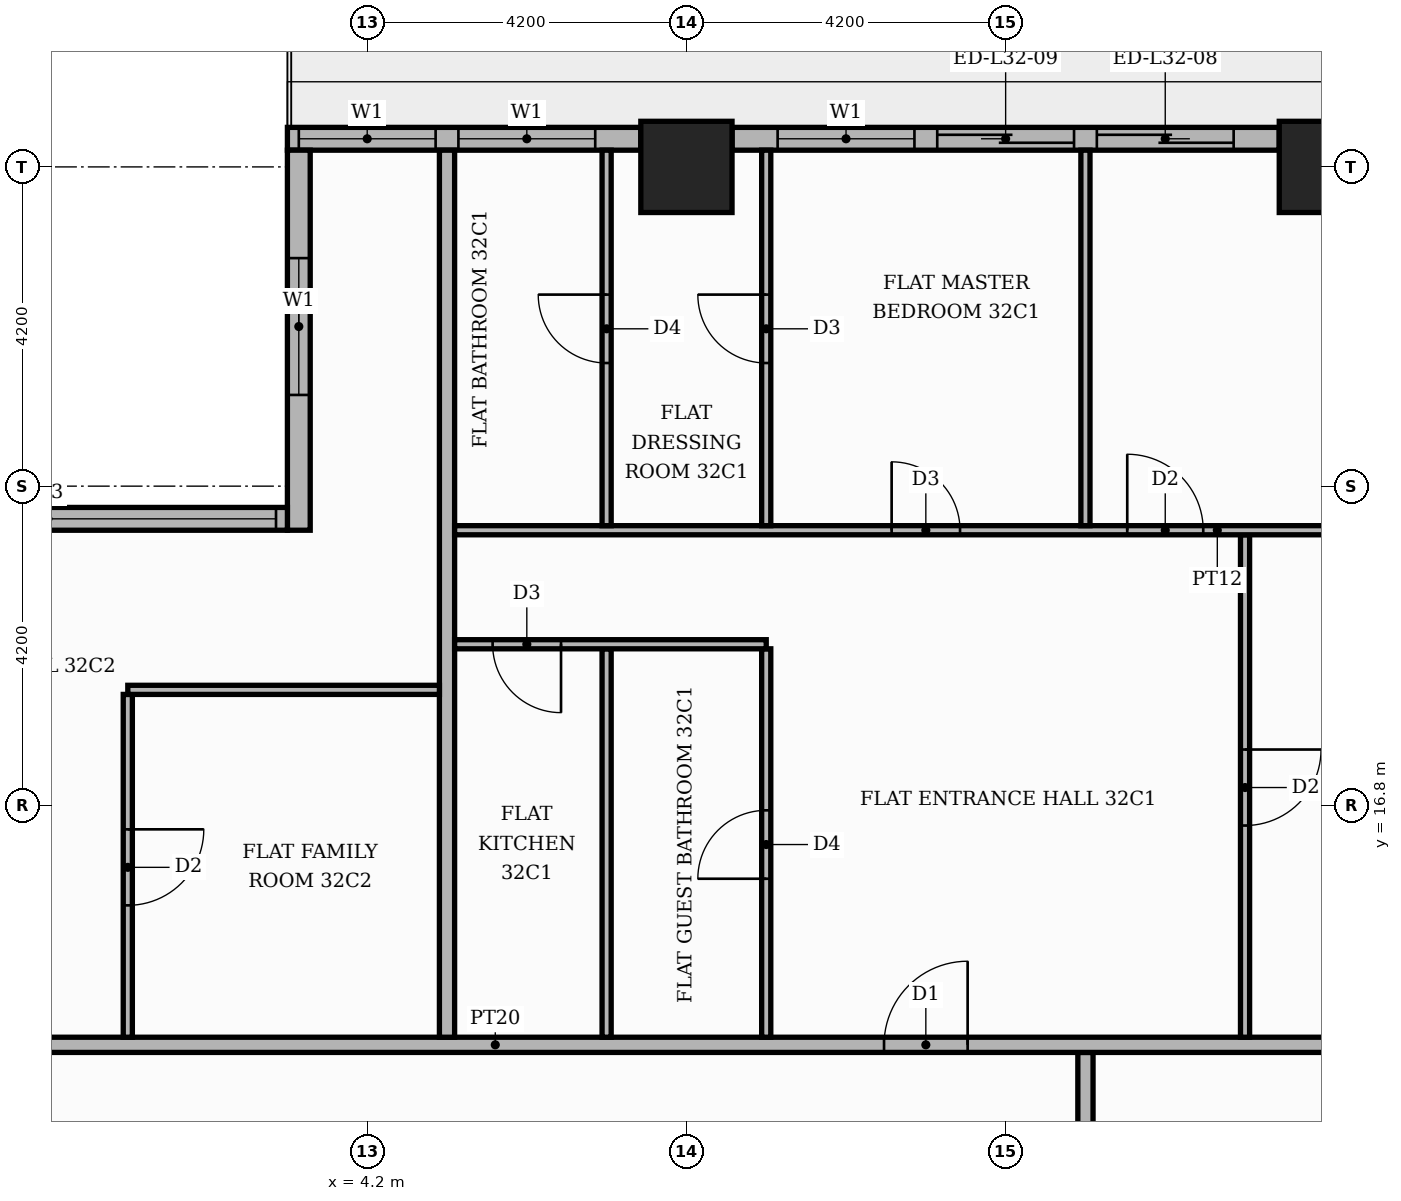
"""IFC4 building model, lengths in metres.
Left out: names, types, materials, properties, quantities, classifications, styles, units other than length and angle.
Written with IfcOpenShell. Run it as: python <this file> out.ifc"""

import sys

from ifc_helpers import new_model, si_unit, direction, frame, frame_2d, origin, origin_2d, place, context, subcontext, project, spatial, rectangle, extrude, element, fill, save


model = new_model("IFC4")
c1 = context("Model", 3, precision=1e-05, world=origin(), true_north=direction((0.0, 1.0)))
c2 = subcontext(c1, "Body", "Model", "MODEL_VIEW")
j1 = project(units=[si_unit("LENGTHUNIT", "METRE"), si_unit("PLANEANGLEUNIT", "RADIAN")], contexts=[c1])
p1 = place(None, origin())
s1 = spatial("IfcSite", under=j1, at=p1, CompositionType="ELEMENT")
p2 = place(p1, origin())
s2 = spatial("IfcBuilding", under=s1, at=p2, CompositionType="ELEMENT")
p3 = place(p2, frame((0.0, 0.0, 137.7)))
s3 = spatial("IfcBuildingStorey", under=s2, at=p3, CompositionType="ELEMENT", Elevation=137.7)
for number, where, z_axis, x_axis in (
    (1, (8.4, 25.2, 0.0), (0.0, 0.0, 1.0), (1.0, 0.0, 0.0)),
    (2, (16.8, 25.2, 0.0), (0.0, 0.0, 1.0), (1.0, 0.0, 0.0)),
):
    element("IfcColumn", number, at=place(p3, frame(where, z_axis=z_axis, x_axis=x_axis)), inside=s3, PredefinedType="COLUMN", context=c2, shape_type="SweptSolid", body=[
        extrude(rectangle(XDim=1.2, YDim=1.2, at=origin_2d()), origin(), (0.0, 0.0, 1.0), 3.9),
    ])
p4 = place(p3, frame((16.2, 25.57, 0.0), z_axis=(0.0, 0.0, 1.0), x_axis=(-1.0, 0.0, 0.0)))
e3 = element("IfcWall", 3, at=p4, inside=s3, PredefinedType="STANDARD", context=c2, shape_type="SweptSolid", body=[
    extrude(rectangle(XDim=7.2, YDim=0.3, at=frame_2d((3.6, 0.0))), origin(), (0.0, 0.0, 1.0), 3.48),
])
p5 = place(p4, frame((0.6, 0.0, 0.0)))
e4 = element("IfcOpeningElement", 4, at=p5, cuts=e3, PredefinedType="OPENING", context=c2, shape_type="SweptSolid", body=[
    extrude(rectangle(XDim=1.8, YDim=2.4, at=frame_2d((0.9, 1.2))), frame((0.0, 0.16, 0.0), z_axis=(0.0, -1.0, 0.0), x_axis=(1.0, 0.0, 0.0)), (0.0, 0.0, 1.0), 0.32),
])
p6 = place(p4, frame((2.7, 0.0, 0.0)))
e5 = element("IfcOpeningElement", 5, at=p6, cuts=e3, PredefinedType="OPENING", context=c2, shape_type="SweptSolid", body=[
    extrude(rectangle(XDim=1.8, YDim=2.4, at=frame_2d((0.9, 1.2))), frame((0.0, 0.16, 0.0), z_axis=(0.0, -1.0, 0.0), x_axis=(1.0, 0.0, 0.0)), (0.0, 0.0, 1.0), 0.32),
])
p7 = place(p4, frame((4.8, 0.0, 0.9)))
e6 = element("IfcOpeningElement", 6, at=p7, cuts=e3, PredefinedType="OPENING", context=c2, shape_type="SweptSolid", body=[
    extrude(rectangle(XDim=1.8, YDim=2.1, at=frame_2d((0.9, 1.05))), frame((0.0, 0.16, 0.0), z_axis=(0.0, -1.0, 0.0), x_axis=(1.0, 0.0, 0.0)), (0.0, 0.0, 1.0), 0.32),
])
p8 = place(p3, frame((7.8, 25.57, 0.0), z_axis=(0.0, 0.0, 1.0), x_axis=(-1.0, 0.0, 0.0)))
e7 = element("IfcWall", 7, at=p8, inside=s3, PredefinedType="STANDARD", context=c2, shape_type="SweptSolid", body=[
    extrude(rectangle(XDim=4.65, YDim=0.3, at=frame_2d((2.325, 0.0))), origin(), (0.0, 0.0, 1.0), 3.48),
])
p9 = place(p8, frame((0.6, 0.0, 0.9)))
e8 = element("IfcOpeningElement", 8, at=p9, cuts=e7, PredefinedType="OPENING", context=c2, shape_type="SweptSolid", body=[
    extrude(rectangle(XDim=1.8, YDim=2.1, at=frame_2d((0.9, 1.05))), frame((0.0, 0.16, 0.0), z_axis=(0.0, -1.0, 0.0), x_axis=(1.0, 0.0, 0.0)), (0.0, 0.0, 1.0), 0.32),
])
p10 = place(p8, frame((2.7, 0.0, 0.9)))
e9 = element("IfcOpeningElement", 9, at=p10, cuts=e7, PredefinedType="OPENING", context=c2, shape_type="SweptSolid", body=[
    extrude(rectangle(XDim=1.8, YDim=2.1, at=frame_2d((0.9, 1.05))), frame((0.0, 0.16, 0.0), z_axis=(0.0, -1.0, 0.0), x_axis=(1.0, 0.0, 0.0)), (0.0, 0.0, 1.0), 0.32),
])
p11 = place(p3, frame((3.3, 25.42, 0.0), z_axis=(0.0, 0.0, 1.0), x_axis=(0.0, -1.0, 0.0)))
e10 = element("IfcWall", 10, at=p11, inside=s3, PredefinedType="STANDARD", context=c2, shape_type="SweptSolid", body=[
    extrude(rectangle(XDim=5.0, YDim=0.3, at=frame_2d((2.5, 0.0))), origin(), (0.0, 0.0, 1.0), 3.48),
])
p12 = place(p11, frame((1.42, 0.0, 0.9)))
e11 = element("IfcOpeningElement", 11, at=p12, cuts=e10, PredefinedType="OPENING", context=c2, shape_type="SweptSolid", body=[
    extrude(rectangle(XDim=1.8, YDim=2.1, at=frame_2d((0.9, 1.05))), frame((0.0, 0.16, 0.0), z_axis=(0.0, -1.0, 0.0), x_axis=(1.0, 0.0, 0.0)), (0.0, 0.0, 1.0), 0.32),
])
p13 = place(p3, frame((3.15, 20.57, 0.0), z_axis=(0.0, 0.0, 1.0), x_axis=(-1.0, 0.0, 0.0)))
e12 = element("IfcWall", 12, at=p13, inside=s3, PredefinedType="STANDARD", context=c2, shape_type="SweptSolid", body=[
    extrude(rectangle(XDim=6.6, YDim=0.3, at=frame_2d((3.3, 0.0))), origin(), (0.0, 0.0, 1.0), 3.48),
])
p14 = place(p13, frame((0.15, 0.0, 0.9)))
e13 = element("IfcOpeningElement", 13, at=p14, cuts=e12, PredefinedType="OPENING", context=c2, shape_type="SweptSolid", body=[
    extrude(rectangle(XDim=6.0, YDim=2.1, at=frame_2d((3.0, 1.05))), frame((0.0, 0.16, 0.0), z_axis=(0.0, -1.0, 0.0), x_axis=(1.0, 0.0, 0.0)), (0.0, 0.0, 1.0), 0.32),
])
p15 = place(p3, frame((13.65, 11.1, 0.0), z_axis=(0.0, 0.0, 1.0), x_axis=(0.0, 1.0, 0.0)))
e14 = element("IfcWall", 14, at=p15, inside=s3, PredefinedType="PARTITIONING", context=c2, shape_type="SweptSolid", body=[
    extrude(rectangle(XDim=2.45, YDim=0.2, at=frame_2d((1.225, 0.0))), origin(), (0.0, 0.0, 1.0), 3.48),
])
p16 = place(p3, frame((-13.65, 13.65, 0.0), z_axis=(0.0, 0.0, 1.0), x_axis=(1.0, 0.0, 0.0)))
e15 = element("IfcWall", 15, at=p16, inside=s3, PredefinedType="PARTITIONING", context=c2, shape_type="SweptSolid", body=[
    extrude(rectangle(XDim=39.07, YDim=0.2, at=frame_2d((19.535, 0.0))), origin(), (0.0, 0.0, 1.0), 3.48),
])
p17 = place(p16, frame((24.65, 0.0, 0.0)))
e16 = element("IfcOpeningElement", 16, at=p17, cuts=e15, PredefinedType="OPENING", context=c2, shape_type="SweptSolid", body=[
    extrude(rectangle(XDim=1.1, YDim=2.4, at=frame_2d((0.55, 1.2))), frame((0.0, 0.11, 0.0), z_axis=(0.0, -1.0, 0.0), x_axis=(1.0, 0.0, 0.0)), (0.0, 0.0, 1.0), 0.22),
])
p18 = place(p16, frame((12.05, 0.0, 0.0)))
e17 = element("IfcOpeningElement", 17, at=p18, cuts=e15, PredefinedType="OPENING", context=c2, shape_type="SweptSolid", body=[
    extrude(rectangle(XDim=1.1, YDim=2.4, at=frame_2d((0.55, 1.2))), frame((0.0, 0.11, 0.0), z_axis=(0.0, -1.0, 0.0), x_axis=(1.0, 0.0, 0.0)), (0.0, 0.0, 1.0), 0.22),
])
p19 = place(p3, frame((1.05, 13.75, 0.0), z_axis=(0.0, 0.0, 1.0), x_axis=(0.0, 1.0, 0.0)))
e18 = element("IfcWall", 18, at=p19, inside=s3, PredefinedType="PARTITIONING", context=c2, shape_type="SweptSolid", body=[
    extrude(rectangle(XDim=4.51, YDim=0.12, at=frame_2d((2.255, 0.0))), origin(), (0.0, 0.0, 1.0), 3.48),
])
p20 = place(p19, frame((1.735, 0.0, 0.0)))
e19 = element("IfcOpeningElement", 19, at=p20, cuts=e18, PredefinedType="OPENING", context=c2, shape_type="SweptSolid", body=[
    extrude(rectangle(XDim=1.0, YDim=2.1, at=frame_2d((0.5, 1.05))), frame((0.0, 0.07, 0.0), z_axis=(0.0, -1.0, 0.0), x_axis=(1.0, 0.0, 0.0)), (0.0, 0.0, 1.0), 0.14),
])
p21 = place(p3, frame((5.25, 13.75, 0.0), z_axis=(0.0, 0.0, 1.0), x_axis=(0.0, 1.0, 0.0)))
e20 = element("IfcWall", 20, at=p21, inside=s3, PredefinedType="PARTITIONING", context=c2, shape_type="SweptSolid", body=[
    extrude(rectangle(XDim=11.67, YDim=0.2, at=frame_2d((5.835, 0.0))), origin(), (0.0, 0.0, 1.0), 3.48),
])
p22 = place(p3, frame((7.35, 13.75, 0.0), z_axis=(0.0, 0.0, 1.0), x_axis=(0.0, 1.0, 0.0)))
e21 = element("IfcWall", 21, at=p22, inside=s3, PredefinedType="PARTITIONING", context=c2, shape_type="SweptSolid", body=[
    extrude(rectangle(XDim=5.11, YDim=0.12, at=frame_2d((2.555, 0.0))), origin(), (0.0, 0.0, 1.0), 3.48),
])
p23 = place(p3, frame((9.45, 13.75, 0.0), z_axis=(0.0, 0.0, 1.0), x_axis=(0.0, 1.0, 0.0)))
e22 = element("IfcWall", 22, at=p23, inside=s3, PredefinedType="PARTITIONING", context=c2, shape_type="SweptSolid", body=[
    extrude(rectangle(XDim=5.11, YDim=0.12, at=frame_2d((2.555, 0.0))), origin(), (0.0, 0.0, 1.0), 3.48),
])
p24 = place(p23, frame((2.085, 0.0, 0.0)))
e23 = element("IfcOpeningElement", 23, at=p24, cuts=e22, PredefinedType="OPENING", context=c2, shape_type="SweptSolid", body=[
    extrude(rectangle(XDim=0.9, YDim=2.1, at=frame_2d((0.45, 1.05))), frame((0.0, 0.07, 0.0), z_axis=(0.0, -1.0, 0.0), x_axis=(1.0, 0.0, 0.0)), (0.0, 0.0, 1.0), 0.14),
])
p25 = place(p3, frame((15.75, 13.75, 0.0), z_axis=(0.0, 0.0, 1.0), x_axis=(0.0, 1.0, 0.0)))
e24 = element("IfcWall", 24, at=p25, inside=s3, PredefinedType="PARTITIONING", context=c2, shape_type="SweptSolid", body=[
    extrude(rectangle(XDim=6.61, YDim=0.12, at=frame_2d((3.305, 0.0))), origin(), (0.0, 0.0, 1.0), 3.48),
])
p26 = place(p25, frame((2.785, 0.0, 0.0)))
e25 = element("IfcOpeningElement", 25, at=p26, cuts=e24, PredefinedType="OPENING", context=c2, shape_type="SweptSolid", body=[
    extrude(rectangle(XDim=1.0, YDim=2.1, at=frame_2d((0.5, 1.05))), frame((0.0, 0.07, 0.0), z_axis=(0.0, -1.0, 0.0), x_axis=(1.0, 0.0, 0.0)), (0.0, 0.0, 1.0), 0.14),
])
p27 = place(p3, frame((1.05, 18.32, 0.0), z_axis=(0.0, 0.0, 1.0), x_axis=(1.0, 0.0, 0.0)))
e26 = element("IfcWall", 26, at=p27, inside=s3, PredefinedType="PARTITIONING", context=c2, shape_type="SweptSolid", body=[
    extrude(rectangle(XDim=4.1, YDim=0.12, at=frame_2d((2.05, 0.0))), origin(), (0.0, 0.0, 1.0), 3.48),
])
p28 = place(p3, frame((5.35, 18.92, 0.0), z_axis=(0.0, 0.0, 1.0), x_axis=(1.0, 0.0, 0.0)))
e27 = element("IfcWall", 27, at=p28, inside=s3, PredefinedType="PARTITIONING", context=c2, shape_type="SweptSolid", body=[
    extrude(rectangle(XDim=4.1, YDim=0.12, at=frame_2d((2.05, 0.0))), origin(), (0.0, 0.0, 1.0), 3.48),
])
p29 = place(p28, frame((0.5, 0.0, 0.0)))
e28 = element("IfcOpeningElement", 28, at=p29, cuts=e27, PredefinedType="OPENING", context=c2, shape_type="SweptSolid", body=[
    extrude(rectangle(XDim=0.9, YDim=2.1, at=frame_2d((0.45, 1.05))), frame((0.0, 0.07, 0.0), z_axis=(0.0, -1.0, 0.0), x_axis=(1.0, 0.0, 0.0)), (0.0, 0.0, 1.0), 0.14),
])
p30 = place(p3, frame((5.35, 20.42, 0.0), z_axis=(0.0, 0.0, 1.0), x_axis=(1.0, 0.0, 0.0)))
e29 = element("IfcWall", 29, at=p30, inside=s3, PredefinedType="PARTITIONING", context=c2, shape_type="SweptSolid", body=[
    extrude(rectangle(XDim=20.07, YDim=0.12, at=frame_2d((10.035, 0.0))), origin(), (0.0, 0.0, 1.0), 3.48),
])
p31 = place(p30, frame((8.85, 0.0, 0.0)))
e30 = element("IfcOpeningElement", 30, at=p31, cuts=e29, PredefinedType="OPENING", context=c2, shape_type="SweptSolid", body=[
    extrude(rectangle(XDim=1.0, YDim=2.1, at=frame_2d((0.5, 1.05))), frame((0.0, 0.07, 0.0), z_axis=(0.0, -1.0, 0.0), x_axis=(1.0, 0.0, 0.0)), (0.0, 0.0, 1.0), 0.14),
])
p32 = place(p30, frame((5.75, 0.0, 0.0)))
e31 = element("IfcOpeningElement", 31, at=p32, cuts=e29, PredefinedType="OPENING", context=c2, shape_type="SweptSolid", body=[
    extrude(rectangle(XDim=0.9, YDim=2.1, at=frame_2d((0.45, 1.05))), frame((0.0, 0.07, 0.0), z_axis=(0.0, -1.0, 0.0), x_axis=(1.0, 0.0, 0.0)), (0.0, 0.0, 1.0), 0.14),
])
p33 = place(p3, frame((7.35, 20.48, 0.0), z_axis=(0.0, 0.0, 1.0), x_axis=(0.0, 1.0, 0.0)))
e32 = element("IfcWall", 32, at=p33, inside=s3, PredefinedType="PARTITIONING", context=c2, shape_type="SweptSolid", body=[
    extrude(rectangle(XDim=4.94, YDim=0.12, at=frame_2d((2.47, 0.0))), origin(), (0.0, 0.0, 1.0), 3.48),
])
p34 = place(p33, frame((2.14, 0.0, 0.0)))
e33 = element("IfcOpeningElement", 33, at=p34, cuts=e32, PredefinedType="OPENING", context=c2, shape_type="SweptSolid", body=[
    extrude(rectangle(XDim=0.9, YDim=2.1, at=frame_2d((0.45, 1.05))), frame((0.0, 0.07, 0.0), z_axis=(0.0, -1.0, 0.0), x_axis=(1.0, 0.0, 0.0)), (0.0, 0.0, 1.0), 0.14),
])
p35 = place(p3, frame((9.45, 20.48, 0.0), z_axis=(0.0, 0.0, 1.0), x_axis=(0.0, 1.0, 0.0)))
e34 = element("IfcWall", 34, at=p35, inside=s3, PredefinedType="PARTITIONING", context=c2, shape_type="SweptSolid", body=[
    extrude(rectangle(XDim=4.94, YDim=0.12, at=frame_2d((2.47, 0.0))), origin(), (0.0, 0.0, 1.0), 3.48),
])
p36 = place(p35, frame((2.14, 0.0, 0.0)))
e35 = element("IfcOpeningElement", 35, at=p36, cuts=e34, PredefinedType="OPENING", context=c2, shape_type="SweptSolid", body=[
    extrude(rectangle(XDim=0.9, YDim=2.1, at=frame_2d((0.45, 1.05))), frame((0.0, 0.07, 0.0), z_axis=(0.0, -1.0, 0.0), x_axis=(1.0, 0.0, 0.0)), (0.0, 0.0, 1.0), 0.14),
])
p37 = place(p3, frame((13.65, 20.48, 0.0), z_axis=(0.0, 0.0, 1.0), x_axis=(0.0, 1.0, 0.0)))
e36 = element("IfcWall", 36, at=p37, inside=s3, PredefinedType="PARTITIONING", context=c2, shape_type="SweptSolid", body=[
    extrude(rectangle(XDim=4.94, YDim=0.12, at=frame_2d((2.47, 0.0))), origin(), (0.0, 0.0, 1.0), 3.48),
])
p38 = place(p5, origin())
e37 = element("IfcDoor", 37, at=p38, inside=s3, OperationType="SLIDING_TO_LEFT", PredefinedType="DOOR", context=c2, shape_type="SweptSolid", body=[
    extrude(rectangle(XDim=1.8, YDim=2.4, at=frame_2d((0.9, 1.2))), frame((0.0, 0.025, 0.0), z_axis=(0.0, -1.0, 0.0), x_axis=(1.0, 0.0, 0.0)), (0.0, 0.0, 1.0), 0.05),
])
fill(e4, e37)
p39 = place(p6, origin())
e38 = element("IfcDoor", 38, at=p39, inside=s3, OperationType="SLIDING_TO_RIGHT", PredefinedType="DOOR", context=c2, shape_type="SweptSolid", body=[
    extrude(rectangle(XDim=1.8, YDim=2.4, at=frame_2d((0.9, 1.2))), frame((0.0, 0.025, 0.0), z_axis=(0.0, -1.0, 0.0), x_axis=(1.0, 0.0, 0.0)), (0.0, 0.0, 1.0), 0.05),
])
fill(e5, e38)
p40 = place(p7, origin())
e39 = element("IfcWindow", 39, at=p40, inside=s3, PartitioningType="SINGLE_PANEL", PredefinedType="WINDOW", context=c2, shape_type="SweptSolid", body=[
    extrude(rectangle(XDim=1.8, YDim=2.1, at=frame_2d((0.9, 1.05))), frame((0.0, 0.03, 0.0), z_axis=(0.0, -1.0, 0.0), x_axis=(1.0, 0.0, 0.0)), (0.0, 0.0, 1.0), 0.06),
])
fill(e6, e39)
p41 = place(p9, origin())
e40 = element("IfcWindow", 40, at=p41, inside=s3, PartitioningType="SINGLE_PANEL", PredefinedType="WINDOW", context=c2, shape_type="SweptSolid", body=[
    extrude(rectangle(XDim=1.8, YDim=2.1, at=frame_2d((0.9, 1.05))), frame((0.0, 0.03, 0.0), z_axis=(0.0, -1.0, 0.0), x_axis=(1.0, 0.0, 0.0)), (0.0, 0.0, 1.0), 0.06),
])
fill(e8, e40)
p42 = place(p10, origin())
e41 = element("IfcWindow", 41, at=p42, inside=s3, PartitioningType="SINGLE_PANEL", PredefinedType="WINDOW", context=c2, shape_type="SweptSolid", body=[
    extrude(rectangle(XDim=1.8, YDim=2.1, at=frame_2d((0.9, 1.05))), frame((0.0, 0.03, 0.0), z_axis=(0.0, -1.0, 0.0), x_axis=(1.0, 0.0, 0.0)), (0.0, 0.0, 1.0), 0.06),
])
fill(e9, e41)
p43 = place(p12, origin())
e42 = element("IfcWindow", 42, at=p43, inside=s3, PartitioningType="SINGLE_PANEL", PredefinedType="WINDOW", context=c2, shape_type="SweptSolid", body=[
    extrude(rectangle(XDim=1.8, YDim=2.1, at=frame_2d((0.9, 1.05))), frame((0.0, 0.03, 0.0), z_axis=(0.0, -1.0, 0.0), x_axis=(1.0, 0.0, 0.0)), (0.0, 0.0, 1.0), 0.06),
])
fill(e11, e42)
p44 = place(p14, origin())
e43 = element("IfcWindow", 43, at=p44, inside=s3, PartitioningType="SINGLE_PANEL", PredefinedType="WINDOW", context=c2, shape_type="SweptSolid", body=[
    extrude(rectangle(XDim=6.0, YDim=2.1, at=frame_2d((3.0, 1.05))), frame((0.0, 0.03, 0.0), z_axis=(0.0, -1.0, 0.0), x_axis=(1.0, 0.0, 0.0)), (0.0, 0.0, 1.0), 0.06),
])
fill(e13, e43)
p45 = place(p17, origin())
e44 = element("IfcDoor", 44, at=p45, inside=s3, OperationType="SINGLE_SWING_RIGHT", PredefinedType="DOOR", context=c2, shape_type="SweptSolid", body=[
    extrude(rectangle(XDim=1.1, YDim=2.4, at=frame_2d((0.55, 1.2))), frame((0.0, 0.025, 0.0), z_axis=(0.0, -1.0, 0.0), x_axis=(1.0, 0.0, 0.0)), (0.0, 0.0, 1.0), 0.05),
])
fill(e16, e44)
p46 = place(p26, frame((1.0, 0.0, 0.0), z_axis=(0.0, 0.0, 1.0), x_axis=(-1.0, 0.0, 0.0)))
e45 = element("IfcDoor", 45, at=p46, inside=s3, OperationType="SINGLE_SWING_RIGHT", PredefinedType="DOOR", context=c2, shape_type="SweptSolid", body=[
    extrude(rectangle(XDim=1.0, YDim=2.1, at=frame_2d((0.5, 1.05))), frame((0.0, 0.025, 0.0), z_axis=(0.0, -1.0, 0.0), x_axis=(1.0, 0.0, 0.0)), (0.0, 0.0, 1.0), 0.05),
])
fill(e25, e45)
p47 = place(p24, origin())
e46 = element("IfcDoor", 46, at=p47, inside=s3, OperationType="SINGLE_SWING_LEFT", PredefinedType="DOOR", context=c2, shape_type="SweptSolid", body=[
    extrude(rectangle(XDim=0.9, YDim=2.1, at=frame_2d((0.45, 1.05))), frame((0.0, 0.025, 0.0), z_axis=(0.0, -1.0, 0.0), x_axis=(1.0, 0.0, 0.0)), (0.0, 0.0, 1.0), 0.05),
])
fill(e23, e46)
p48 = place(p29, frame((0.9, 0.0, 0.0), z_axis=(0.0, 0.0, 1.0), x_axis=(-1.0, 0.0, 0.0)))
e47 = element("IfcDoor", 47, at=p48, inside=s3, OperationType="SINGLE_SWING_RIGHT", PredefinedType="DOOR", context=c2, shape_type="SweptSolid", body=[
    extrude(rectangle(XDim=0.9, YDim=2.1, at=frame_2d((0.45, 1.05))), frame((0.0, 0.025, 0.0), z_axis=(0.0, -1.0, 0.0), x_axis=(1.0, 0.0, 0.0)), (0.0, 0.0, 1.0), 0.05),
])
fill(e28, e47)
p49 = place(p31, origin())
e48 = element("IfcDoor", 48, at=p49, inside=s3, OperationType="SINGLE_SWING_LEFT", PredefinedType="DOOR", context=c2, shape_type="SweptSolid", body=[
    extrude(rectangle(XDim=1.0, YDim=2.1, at=frame_2d((0.5, 1.05))), frame((0.0, 0.025, 0.0), z_axis=(0.0, -1.0, 0.0), x_axis=(1.0, 0.0, 0.0)), (0.0, 0.0, 1.0), 0.05),
])
fill(e30, e48)
p50 = place(p32, origin())
e49 = element("IfcDoor", 49, at=p50, inside=s3, OperationType="SINGLE_SWING_LEFT", PredefinedType="DOOR", context=c2, shape_type="SweptSolid", body=[
    extrude(rectangle(XDim=0.9, YDim=2.1, at=frame_2d((0.45, 1.05))), frame((0.0, 0.025, 0.0), z_axis=(0.0, -1.0, 0.0), x_axis=(1.0, 0.0, 0.0)), (0.0, 0.0, 1.0), 0.05),
])
fill(e31, e49)
p51 = place(p36, origin())
e50 = element("IfcDoor", 50, at=p51, inside=s3, OperationType="SINGLE_SWING_RIGHT", PredefinedType="DOOR", context=c2, shape_type="SweptSolid", body=[
    extrude(rectangle(XDim=0.9, YDim=2.1, at=frame_2d((0.45, 1.05))), frame((0.0, 0.025, 0.0), z_axis=(0.0, -1.0, 0.0), x_axis=(1.0, 0.0, 0.0)), (0.0, 0.0, 1.0), 0.05),
])
fill(e35, e50)
p52 = place(p34, origin())
e51 = element("IfcDoor", 51, at=p52, inside=s3, OperationType="SINGLE_SWING_RIGHT", PredefinedType="DOOR", context=c2, shape_type="SweptSolid", body=[
    extrude(rectangle(XDim=0.9, YDim=2.1, at=frame_2d((0.45, 1.05))), frame((0.0, 0.025, 0.0), z_axis=(0.0, -1.0, 0.0), x_axis=(1.0, 0.0, 0.0)), (0.0, 0.0, 1.0), 0.05),
])
fill(e33, e51)
p53 = place(p20, frame((1.0, 0.0, 0.0), z_axis=(0.0, 0.0, 1.0), x_axis=(-1.0, 0.0, 0.0)))
e52 = element("IfcDoor", 52, at=p53, inside=s3, OperationType="SINGLE_SWING_RIGHT", PredefinedType="DOOR", context=c2, shape_type="SweptSolid", body=[
    extrude(rectangle(XDim=1.0, YDim=2.1, at=frame_2d((0.5, 1.05))), frame((0.0, 0.025, 0.0), z_axis=(0.0, -1.0, 0.0), x_axis=(1.0, 0.0, 0.0)), (0.0, 0.0, 1.0), 0.05),
])
fill(e19, e52)
save(model, sys.argv[1])
